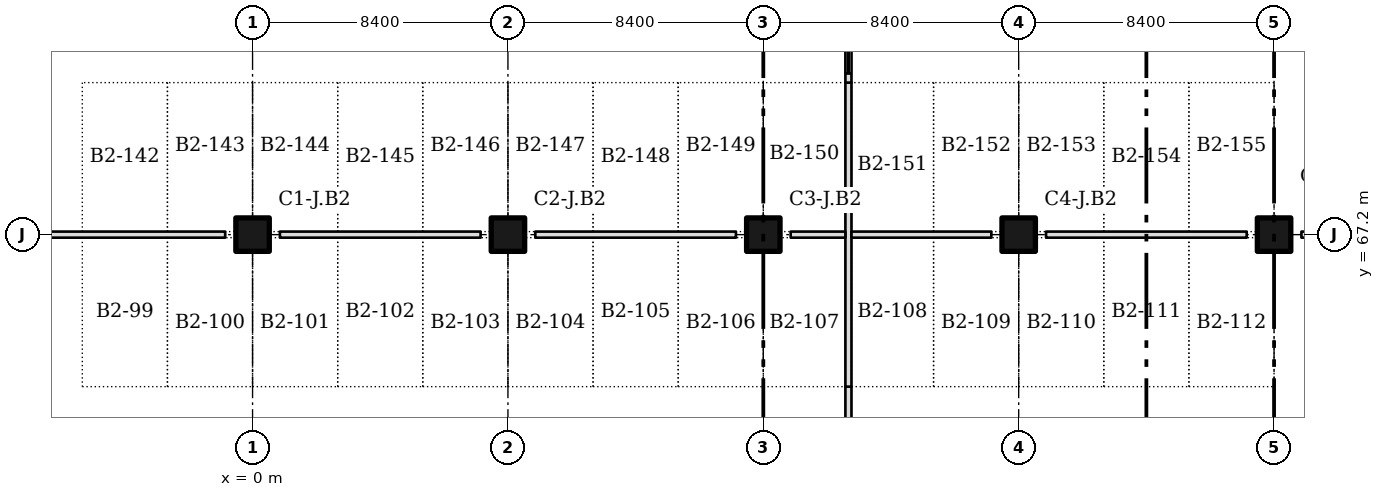
"""IFC4 building model, lengths in metres.
Left out: names, types, materials, properties, quantities, classifications, styles, units other than length and angle.
Written with IfcOpenShell. Run it as: python <this file> out.ifc"""

import sys

from ifc_helpers import new_model, si_unit, direction, frame, frame_2d, origin, origin_2d, place, context, subcontext, project, spatial, rectangle, extrude, element, fill, save


model = new_model("IFC4")
c1 = context("Model", 3, precision=1e-05, world=origin(), true_north=direction((0.0, 1.0)))
c2 = subcontext(c1, "Body", "Model", "MODEL_VIEW")
j1 = project(units=[si_unit("LENGTHUNIT", "METRE"), si_unit("PLANEANGLEUNIT", "RADIAN")], contexts=[c1])
p1 = place(None, origin())
s1 = spatial("IfcSite", under=j1, at=p1, CompositionType="ELEMENT")
p2 = place(p1, origin())
s2 = spatial("IfcBuilding", under=s1, at=p2, CompositionType="ELEMENT")
p3 = place(p2, frame((0.0, 0.0, -8.0)))
s3 = spatial("IfcBuildingStorey", under=s2, at=p3, CompositionType="ELEMENT", Elevation=-8.0)
for number, where, z_axis, x_axis in (
    (1, (0.0, 67.2, 0.0), (0.0, 0.0, 1.0), (1.0, 0.0, 0.0)),
    (2, (8.4, 67.2, 0.0), (0.0, 0.0, 1.0), (1.0, 0.0, 0.0)),
    (3, (16.8, 67.2, 0.0), (0.0, 0.0, 1.0), (1.0, 0.0, 0.0)),
    (4, (25.2, 67.2, 0.0), (0.0, 0.0, 1.0), (1.0, 0.0, 0.0)),
    (5, (33.6, 67.2, 0.0), (0.0, 0.0, 1.0), (1.0, 0.0, 0.0)),
):
    element("IfcColumn", number, at=place(p3, frame(where, z_axis=z_axis, x_axis=x_axis)), inside=s3, PredefinedType="COLUMN", context=c2, shape_type="SweptSolid", body=[
        extrude(rectangle(XDim=1.1, YDim=1.1, at=origin_2d()), origin(), (0.0, 0.0, 1.0), 3.7),
    ])
p4 = place(p3, frame((19.6, 58.8, 0.0), z_axis=(0.0, 0.0, 1.0), x_axis=(0.0, 1.0, 0.0)))
e6 = element("IfcWall", 6, at=p4, inside=s3, PredefinedType="PARTITIONING", context=c2, shape_type="SweptSolid", body=[
    extrude(rectangle(XDim=3.4, YDim=0.2, at=frame_2d((1.7, 0.0))), origin(), (0.0, 0.0, 1.0), 3.7),
])
p5 = place(p3, frame((19.6, 62.2, 0.0), z_axis=(0.0, 0.0, 1.0), x_axis=(0.0, 1.0, 0.0)))
e7 = element("IfcWall", 7, at=p5, inside=s3, PredefinedType="PARTITIONING", context=c2, shape_type="SweptSolid", body=[
    extrude(rectangle(XDim=10.0, YDim=0.2, at=frame_2d((5.0, 0.0))), origin(), (0.0, 0.0, 1.0), 3.7),
])
p6 = place(p3, frame((19.6, 72.2, 0.0), z_axis=(0.0, 0.0, 1.0), x_axis=(0.0, 1.0, 0.0)))
e8 = element("IfcWall", 8, at=p6, inside=s3, PredefinedType="PARTITIONING", context=c2, shape_type="SweptSolid", body=[
    extrude(rectangle(XDim=6.8, YDim=0.2, at=frame_2d((3.4, 0.0))), origin(), (0.0, 0.0, 1.0), 3.7),
])
p7 = place(p6, frame((0.3, 0.0, 0.0)))
e9 = element("IfcOpeningElement", 9, at=p7, cuts=e8, PredefinedType="OPENING", context=c2, shape_type="SweptSolid", body=[
    extrude(rectangle(XDim=4.8, YDim=2.4, at=frame_2d((2.4, 1.2))), frame((0.0, 0.11, 0.0), z_axis=(0.0, -1.0, 0.0), x_axis=(1.0, 0.0, 0.0)), (0.0, 0.0, 1.0), 0.22),
])
p8 = place(p6, frame((5.4, 0.0, 0.0)))
e10 = element("IfcOpeningElement", 10, at=p8, cuts=e8, PredefinedType="OPENING", context=c2, shape_type="SweptSolid", body=[
    extrude(rectangle(XDim=1.0, YDim=2.1, at=frame_2d((0.5, 1.05))), frame((0.0, 0.11, 0.0), z_axis=(0.0, -1.0, 0.0), x_axis=(1.0, 0.0, 0.0)), (0.0, 0.0, 1.0), 0.22),
])
for number, where, z_axis, x_axis in (
    (11, (-7.5, 67.2, 0.0), (0.0, 0.0, 1.0), (1.0, 0.0, 0.0)),
    (12, (0.9, 67.2, 0.0), (0.0, 0.0, 1.0), (1.0, 0.0, 0.0)),
):
    element("IfcWall", number, at=place(p3, frame(where, z_axis=z_axis, x_axis=x_axis)), inside=s3, PredefinedType="PARTITIONING", context=c2, shape_type="SweptSolid", body=[
        extrude(rectangle(XDim=6.6, YDim=0.2, at=frame_2d((3.3, 0.0))), origin(), (0.0, 0.0, 1.0), 3.7),
    ])
p9 = place(p3, frame((9.3, 67.2, 0.0), z_axis=(0.0, 0.0, 1.0), x_axis=(1.0, 0.0, 0.0)))
e13 = element("IfcWall", 13, at=p9, inside=s3, PredefinedType="PARTITIONING", context=c2, shape_type="SweptSolid", body=[
    extrude(rectangle(XDim=6.6, YDim=0.2, at=frame_2d((3.3, 0.0))), origin(), (0.0, 0.0, 1.0), 3.7),
])
p10 = place(p3, frame((17.7, 67.2, 0.0), z_axis=(0.0, 0.0, 1.0), x_axis=(1.0, 0.0, 0.0)))
e14 = element("IfcWall", 14, at=p10, inside=s3, PredefinedType="PARTITIONING", context=c2, shape_type="SweptSolid", body=[
    extrude(rectangle(XDim=1.8, YDim=0.2, at=frame_2d((0.9, 0.0))), origin(), (0.0, 0.0, 1.0), 3.7),
])
p11 = place(p3, frame((19.7, 67.2, 0.0), z_axis=(0.0, 0.0, 1.0), x_axis=(1.0, 0.0, 0.0)))
e15 = element("IfcWall", 15, at=p11, inside=s3, PredefinedType="PARTITIONING", context=c2, shape_type="SweptSolid", body=[
    extrude(rectangle(XDim=4.6, YDim=0.2, at=frame_2d((2.3, 0.0))), origin(), (0.0, 0.0, 1.0), 3.7),
])
p12 = place(p3, frame((26.1, 67.2, 0.0), z_axis=(0.0, 0.0, 1.0), x_axis=(1.0, 0.0, 0.0)))
e16 = element("IfcWall", 16, at=p12, inside=s3, PredefinedType="PARTITIONING", context=c2, shape_type="SweptSolid", body=[
    extrude(rectangle(XDim=6.6, YDim=0.2, at=frame_2d((3.3, 0.0))), origin(), (0.0, 0.0, 1.0), 3.7),
])
p13 = place(p3, frame((34.5, 67.2, 0.0), z_axis=(0.0, 0.0, 1.0), x_axis=(1.0, 0.0, 0.0)))
e17 = element("IfcWall", 17, at=p13, inside=s3, PredefinedType="PARTITIONING", context=c2, shape_type="SweptSolid", body=[
    extrude(rectangle(XDim=6.6, YDim=0.2, at=frame_2d((3.3, 0.0))), origin(), (0.0, 0.0, 1.0), 3.7),
])
p14 = place(p13, frame((0.3, 0.0, 0.0)))
e18 = element("IfcOpeningElement", 18, at=p14, cuts=e17, PredefinedType="OPENING", context=c2, shape_type="SweptSolid", body=[
    extrude(rectangle(XDim=4.8, YDim=2.4, at=frame_2d((2.4, 1.2))), frame((0.0, 0.11, 0.0), z_axis=(0.0, -1.0, 0.0), x_axis=(1.0, 0.0, 0.0)), (0.0, 0.0, 1.0), 0.22),
])
p15 = place(p13, frame((5.3, 0.0, 0.0)))
e19 = element("IfcOpeningElement", 19, at=p15, cuts=e17, PredefinedType="OPENING", context=c2, shape_type="SweptSolid", body=[
    extrude(rectangle(XDim=1.0, YDim=2.1, at=frame_2d((0.5, 1.05))), frame((0.0, 0.11, 0.0), z_axis=(0.0, -1.0, 0.0), x_axis=(1.0, 0.0, 0.0)), (0.0, 0.0, 1.0), 0.22),
])
p16 = place(p7, origin())
e20 = element("IfcDoor", 20, at=p16, inside=s3, OperationType="ROLLINGUP", PredefinedType="GATE", context=c2, shape_type="SweptSolid", body=[
    extrude(rectangle(XDim=4.8, YDim=2.4, at=frame_2d((2.4, 1.2))), frame((0.0, 0.025, 0.0), z_axis=(0.0, -1.0, 0.0), x_axis=(1.0, 0.0, 0.0)), (0.0, 0.0, 1.0), 0.05),
])
fill(e9, e20)
save(model, sys.argv[1])
